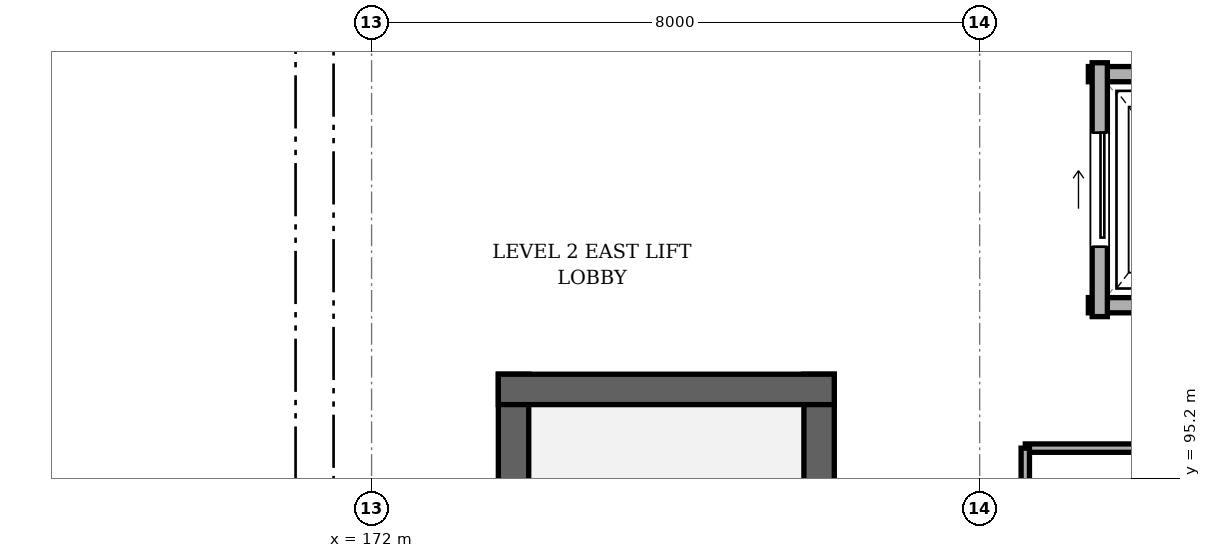
"""IFC4 building model, lengths in metres.
Left out: names, types, materials, properties, quantities, classifications, styles, units other than length and angle.
Written with IfcOpenShell. Run it as: python <this file> out.ifc"""

import sys

from ifc_helpers import new_model, si_unit, direction, frame, frame_2d, origin, place, context, subcontext, project, spatial, rectangle, extrude, element, fill, save


model = new_model("IFC4")
c1 = context("Model", 3, precision=1e-05, world=origin(), true_north=direction((0.0, 1.0)))
c2 = subcontext(c1, "Body", "Model", "MODEL_VIEW")
j1 = project(units=[si_unit("LENGTHUNIT", "METRE"), si_unit("PLANEANGLEUNIT", "RADIAN")], contexts=[c1])
p1 = place(None, origin())
s1 = spatial("IfcSite", under=j1, at=p1, CompositionType="ELEMENT")
p2 = place(p1, origin())
s2 = spatial("IfcBuilding", under=s1, at=p2, CompositionType="ELEMENT")
p3 = place(p2, frame((0.0, 0.0, 10.8)))
s3 = spatial("IfcBuildingStorey", under=s2, at=p3, CompositionType="ELEMENT", Elevation=10.8)
for number, where, z_axis, x_axis in (
    (1, (177.887, 85.975, 0.0), (0.0, 0.0, 1.0), (0.0, 1.0, 0.0)),
    (2, (173.867, 96.573, 0.0), (0.0, 0.0, 1.0), (0.0, -1.0, 0.0)),
):
    element("IfcWall", number, at=place(p3, frame(where, z_axis=z_axis, x_axis=x_axis)), inside=s3, PredefinedType="SHEAR", context=c2, shape_type="SweptSolid", body=[
        extrude(rectangle(XDim=10.597, YDim=0.4, at=frame_2d((5.299, 0.0))), origin(), (0.0, 0.0, 1.0), 3.38),
    ])
p4 = place(p3, frame((178.087, 96.373, 0.0), z_axis=(0.0, 0.0, 1.0), x_axis=(-1.0, 0.0, 0.0)))
e3 = element("IfcWall", 3, at=p4, inside=s3, PredefinedType="SHEAR", context=c2, shape_type="SweptSolid", body=[
    extrude(rectangle(XDim=4.42, YDim=0.4, at=frame_2d((2.21, 0.0))), origin(), (0.0, 0.0, 1.0), 3.38),
])
for number, where, z_axis, x_axis in (
    (4, (181.43, 97.48, 0.0), (0.0, 0.0, 1.0), (1.0, 0.0, 0.0)),
    (5, (184.17, 100.52, 0.0), (0.0, 0.0, 1.0), (-1.0, 0.0, 0.0)),
):
    element("IfcWall", number, at=place(p3, frame(where, z_axis=z_axis, x_axis=x_axis)), inside=s3, PredefinedType="SOLIDWALL", context=c2, shape_type="SweptSolid", body=[
        extrude(rectangle(XDim=2.74, YDim=0.2, at=frame_2d((1.37, 0.0))), origin(), (0.0, 0.0, 1.0), 3.355),
    ])
p5 = place(p3, frame((181.58, 100.67, 0.0), z_axis=(0.0, 0.0, 1.0), x_axis=(0.0, -1.0, 0.0)))
e6 = element("IfcWall", 6, at=p5, inside=s3, PredefinedType="SOLIDWALL", context=c2, shape_type="SweptSolid", body=[
    extrude(rectangle(XDim=3.34, YDim=0.2, at=frame_2d((1.67, 0.0))), origin(), (0.0, 0.0, 1.0), 3.355),
])
p6 = place(p5, frame((0.92, 0.0, 0.0)))
e7 = element("IfcOpeningElement", 7, at=p6, cuts=e6, PredefinedType="OPENING", context=c2, shape_type="SweptSolid", body=[
    extrude(rectangle(XDim=1.5, YDim=2.2, at=frame_2d((0.75, 1.1))), frame((0.0, 0.11, 0.0), z_axis=(0.0, -1.0, 0.0), x_axis=(1.0, 0.0, 0.0)), (0.0, 0.0, 1.0), 0.22),
])
p7 = place(p3, frame((180.6, 95.6, 0.0), z_axis=(0.0, 0.0, 1.0), x_axis=(1.0, 0.0, 0.0)))
e8 = element("IfcWall", 8, at=p7, inside=s3, PredefinedType="PARTITIONING", context=c2, shape_type="SweptSolid", body=[
    extrude(rectangle(XDim=6.6, YDim=0.11, at=frame_2d((3.3, 0.0))), origin(), (0.0, 0.0, 1.0), 2.895),
])
p8 = place(p7, frame((2.7, 0.0, 0.0)))
e9 = element("IfcOpeningElement", 9, at=p8, cuts=e8, PredefinedType="OPENING", context=c2, shape_type="SweptSolid", body=[
    extrude(rectangle(XDim=1.2, YDim=2.1, at=frame_2d((0.6, 1.05))), frame((0.0, 0.065, 0.0), z_axis=(0.0, -1.0, 0.0), x_axis=(1.0, 0.0, 0.0)), (0.0, 0.0, 1.0), 0.13),
])
p9 = place(p3, frame((180.6, 86.4, 0.0), z_axis=(0.0, 0.0, 1.0), x_axis=(0.0, 1.0, 0.0)))
e10 = element("IfcWall", 10, at=p9, inside=s3, PredefinedType="PARTITIONING", context=c2, shape_type="SweptSolid", body=[
    extrude(rectangle(XDim=9.2, YDim=0.11, at=frame_2d((4.6, 0.0))), origin(), (0.0, 0.0, 1.0), 2.915),
])
p10 = place(p6, origin())
e11 = element("IfcDoor", 11, at=p10, inside=s3, OperationType="SLIDING_TO_LEFT", PredefinedType="DOOR", context=c2, shape_type="SweptSolid", body=[
    extrude(rectangle(XDim=1.5, YDim=2.2, at=frame_2d((0.75, 1.1))), frame((0.0, 0.025, 0.0), z_axis=(0.0, -1.0, 0.0), x_axis=(1.0, 0.0, 0.0)), (0.0, 0.0, 1.0), 0.05),
])
fill(e7, e11)
save(model, sys.argv[1])
